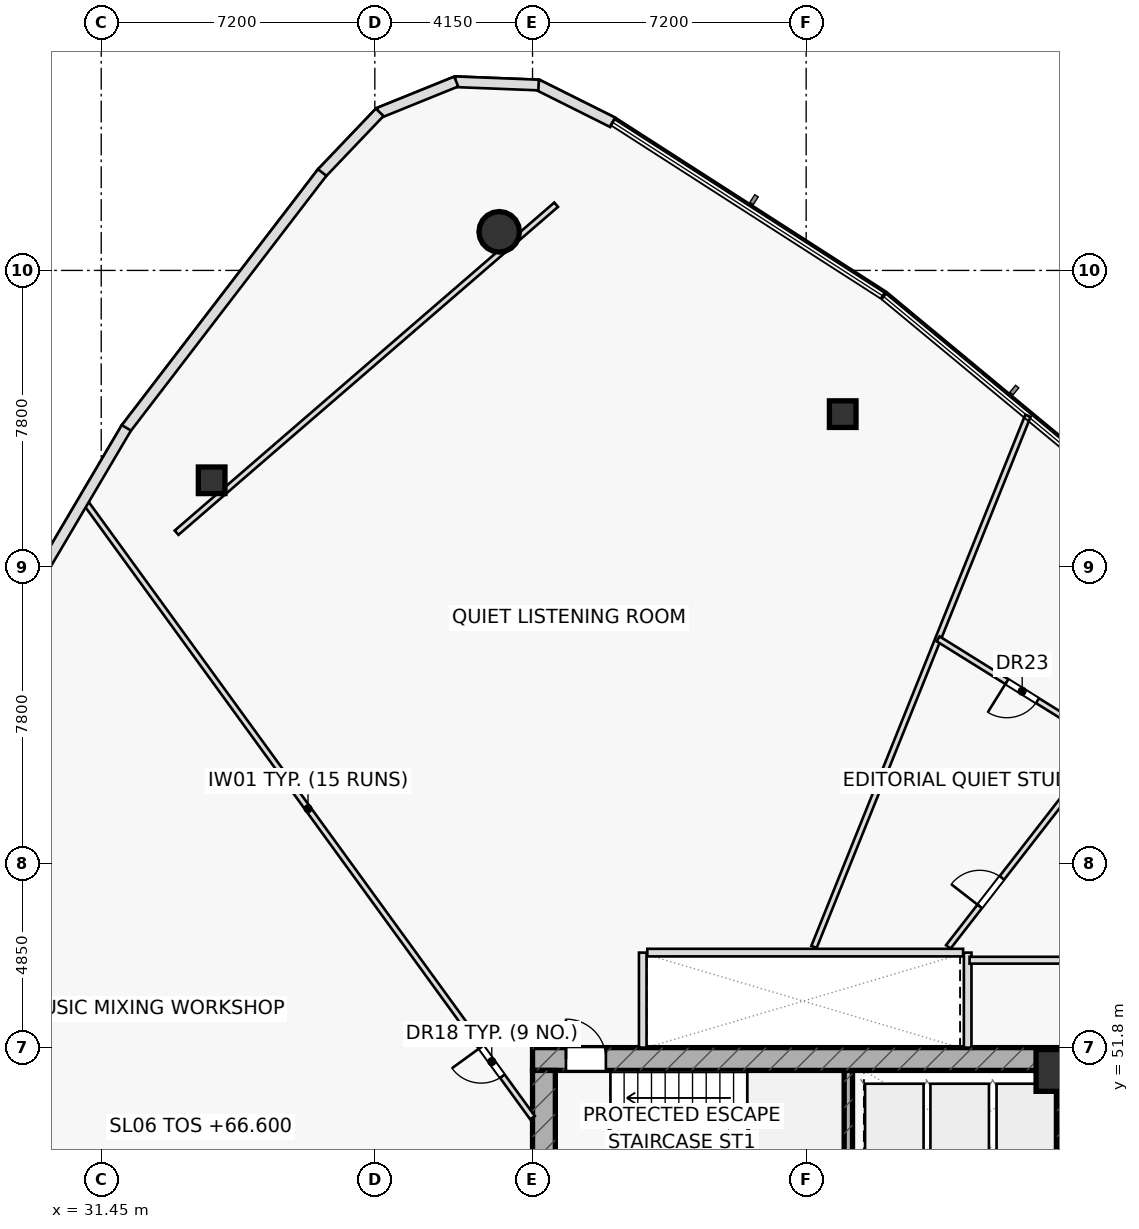
"""IFC4 building model, lengths in metres.
Left out: names, types, materials, properties, quantities, classifications, styles, units other than length and angle.
Written with IfcOpenShell. Run it as: python <this file> out.ifc"""

import sys

from ifc_helpers import new_model, si_unit, direction, frame, frame_2d, origin, origin_2d, place, context, subcontext, project, spatial, rectangle, hollow_rectangle, hollow_circle, extrude, element, fill, save


model = new_model("IFC4")
c1 = context("Model", 3, precision=1e-05, world=origin(), true_north=direction((0.0, 1.0)))
c2 = subcontext(c1, "Body", "Model", "MODEL_VIEW")
j1 = project(units=[si_unit("LENGTHUNIT", "METRE"), si_unit("PLANEANGLEUNIT", "RADIAN")], contexts=[c1])
p1 = place(None, origin())
s1 = spatial("IfcSite", under=j1, at=p1, CompositionType="ELEMENT")
p2 = place(p1, origin())
s2 = spatial("IfcBuilding", under=s1, at=p2, CompositionType="ELEMENT")
p3 = place(p2, frame((0.0, 0.0, 66.6)))
s3 = spatial("IfcBuildingStorey", under=s2, at=p3, CompositionType="ELEMENT", Elevation=66.6)
p4 = place(p3, frame((51.11, 48.1, 0.0), z_axis=(0.0, 0.0, 1.0), x_axis=(0.0, 1.0, 0.0)))
e1 = element("IfcWall", 1, at=p4, inside=s3, PredefinedType="SHEAR", context=c2, shape_type="SweptSolid", body=[
    extrude(rectangle(XDim=3.1, YDim=0.22, at=frame_2d((1.55, 0.0))), origin(), (0.0, 0.0, 1.0), 3.6),
])
p5 = place(p3, frame((42.8, 51.5, 0.0), z_axis=(0.0, 0.0, 1.0), x_axis=(1.0, 0.0, 0.0)))
e2 = element("IfcWall", 2, at=p5, inside=s3, PredefinedType="SHEAR", context=c2, shape_type="SweptSolid", body=[
    extrude(rectangle(XDim=14.4, YDim=0.6, at=frame_2d((7.2, 0.0))), origin(), (0.0, 0.0, 1.0), 3.6),
])
p6 = place(p5, frame((0.88, 0.0, 0.0)))
e3 = element("IfcOpeningElement", 3, at=p6, cuts=e2, PredefinedType="OPENING", context=c2, shape_type="SweptSolid", body=[
    extrude(rectangle(XDim=1.05, YDim=2.2, at=frame_2d((0.525, 1.1))), frame((0.0, 0.31, 0.0), z_axis=(0.0, -1.0, 0.0), x_axis=(1.0, 0.0, 0.0)), (0.0, 0.0, 1.0), 0.62),
])
p7 = place(p3, frame((43.1, 38.8, 0.0), z_axis=(0.0, 0.0, 1.0), x_axis=(0.0, 1.0, 0.0)))
e4 = element("IfcWall", 4, at=p7, inside=s3, PredefinedType="SHEAR", context=c2, shape_type="SweptSolid", body=[
    extrude(rectangle(XDim=12.4, YDim=0.6, at=frame_2d((6.2, 0.0))), origin(), (0.0, 0.0, 1.0), 3.6),
])
p8 = place(p3, frame((56.9, 38.8, 0.0), z_axis=(0.0, 0.0, 1.0), x_axis=(0.0, 1.0, 0.0)))
e5 = element("IfcWall", 5, at=p8, inside=s3, PredefinedType="SHEAR", context=c2, shape_type="SweptSolid", body=[
    extrude(rectangle(XDim=12.4, YDim=0.6, at=frame_2d((6.2, 0.0))), origin(), (0.0, 0.0, 1.0), 3.6),
])
p9 = place(p8, frame((3.85, 0.0, 0.0)))
e6 = element("IfcOpeningElement", 6, at=p9, cuts=e5, PredefinedType="OPENING", context=c2, shape_type="SweptSolid", body=[
    extrude(rectangle(XDim=1.5, YDim=2.2, at=frame_2d((0.75, 1.1))), frame((0.0, 0.31, 0.0), z_axis=(0.0, -1.0, 0.0), x_axis=(1.0, 0.0, 0.0)), (0.0, 0.0, 1.0), 0.62),
])
p10 = place(p3, frame((56.6, 51.2, 0.0), z_axis=(0.0, 0.0, 1.0), x_axis=(1.0, 0.0, 0.0)))
e7 = element("IfcColumn", 7, at=p10, inside=s3, PredefinedType="COLUMN", context=c2, shape_type="SweptSolid", body=[
    extrude(rectangle(XDim=1.1, YDim=1.1, at=origin_2d()), origin(), (0.0, 0.0, 1.0), 3.6),
])
p11 = place(p3, frame((41.923, 73.266, 0.0), z_axis=(0.0, 0.0, 1.0), x_axis=(1.0, 0.0, 0.0)))
e8 = element("IfcColumn", 8, at=p11, inside=s3, PredefinedType="COLUMN", context=c2, shape_type="SweptSolid", body=[
    extrude(hollow_circle(Radius=0.533, WallThickness=0.045, at=origin_2d()), origin(), (0.0, 0.0, 1.0), 3.6),
])
for number, where, z_axis, x_axis in (
    (9, (34.356, 66.728, 0.0), (0.0, 0.0, 1.0), (1.0, 0.0, 0.0)),
    (10, (50.962, 68.469, 0.0), (0.0, 0.0, 1.0), (1.0, 0.0, 0.0)),
):
    element("IfcColumn", number, at=place(p3, frame(where, z_axis=z_axis, x_axis=x_axis)), inside=s3, PredefinedType="COLUMN", context=c2, shape_type="SweptSolid", body=[
        extrude(hollow_rectangle(XDim=0.7, YDim=0.7, WallThickness=0.04, at=origin_2d()), origin(), (0.0, 0.0, 1.0), 3.6),
    ])
for number, where, z_axis, x_axis in (
    (11, (45.7, 51.8, 0.0), (0.0, 0.0, 1.0), (0.0, 1.0, 0.0)),
    (12, (54.25, 51.8, 0.0), (0.0, 0.0, 1.0), (0.0, 1.0, 0.0)),
):
    element("IfcWall", number, at=place(p3, frame(where, z_axis=z_axis, x_axis=x_axis)), inside=s3, PredefinedType="PARTITIONING", context=c2, shape_type="SweptSolid", body=[
        extrude(rectangle(XDim=2.5, YDim=0.2, at=frame_2d((1.25, 0.0))), origin(), (0.0, 0.0, 1.0), 3.6),
    ])
p12 = place(p3, frame((43.421, 73.979, 0.0), z_axis=(0.0, 0.0, 1.0), x_axis=(-0.756659135409, -0.653809569218, 0.0)))
e13 = element("IfcWall", 13, at=p12, inside=s3, PredefinedType="PARTITIONING", context=c2, shape_type="SweptSolid", body=[
    extrude(rectangle(XDim=13.2, YDim=0.15, at=frame_2d((6.6, 0.0))), origin(), (0.0, 0.0, 1.0), 2.975),
])
p13 = place(p3, frame((42.8, 49.955, 0.0), z_axis=(0.0, 0.0, 1.0), x_axis=(-0.587794647475, 0.809010168292, 0.0)))
e14 = element("IfcWall", 14, at=p13, inside=s3, PredefinedType="PARTITIONING", context=c2, shape_type="SweptSolid", body=[
    extrude(rectangle(XDim=20.1, YDim=0.15, at=frame_2d((10.05, 0.0))), origin(), (0.0, 0.0, 1.0), 2.975),
])
p14 = place(p13, frame((1.35, 0.0, 0.0)))
e15 = element("IfcOpeningElement", 15, at=p14, cuts=e14, PredefinedType="OPENING", context=c2, shape_type="SweptSolid", body=[
    extrude(rectangle(XDim=0.95, YDim=2.05, at=frame_2d((0.475, 1.025))), frame((0.0, 0.085, 0.0), z_axis=(0.0, -1.0, 0.0), x_axis=(1.0, 0.0, 0.0)), (0.0, 0.0, 1.0), 0.17),
])
p15 = place(p3, frame((53.74, 54.45, 0.0), z_axis=(0.0, 0.0, 1.0), x_axis=(0.613412549252, 0.789762650687, 0.0)))
e16 = element("IfcWall", 16, at=p15, inside=s3, PredefinedType="PARTITIONING", context=c2, shape_type="SweptSolid", body=[
    extrude(rectangle(XDim=11.686, YDim=0.15, at=frame_2d((5.843, 0.0))), origin(), (0.0, 0.0, 1.0), 2.975),
])
p16 = place(p15, frame((1.35, 0.0, 0.0)))
e17 = element("IfcOpeningElement", 17, at=p16, cuts=e16, PredefinedType="OPENING", context=c2, shape_type="SweptSolid", body=[
    extrude(rectangle(XDim=0.95, YDim=2.05, at=frame_2d((0.475, 1.025))), frame((0.0, 0.085, 0.0), z_axis=(0.0, -1.0, 0.0), x_axis=(1.0, 0.0, 0.0)), (0.0, 0.0, 1.0), 0.17),
])
p17 = place(p3, frame((50.207, 54.45, 0.0), z_axis=(0.0, 0.0, 1.0), x_axis=(0.373638533128, 0.927574388695, 0.0)))
e18 = element("IfcWall", 18, at=p17, inside=s3, PredefinedType="PARTITIONING", context=c2, shape_type="SweptSolid", body=[
    extrude(rectangle(XDim=15.067, YDim=0.15, at=frame_2d((7.534, 0.0))), origin(), (0.0, 0.0, 1.0), 2.975),
])
p18 = place(p3, frame((57.898, 59.803, 0.0), z_axis=(0.0, 0.0, 1.0), x_axis=(-0.849125227798, 0.52819158221, 0.0)))
e19 = element("IfcWall", 19, at=p18, inside=s3, PredefinedType="PARTITIONING", context=c2, shape_type="SweptSolid", body=[
    extrude(rectangle(XDim=5.212, YDim=0.15, at=frame_2d((2.606, 0.0))), origin(), (0.0, 0.0, 1.0), 2.975),
])
p19 = place(p18, frame((2.131, 0.0, 0.0)))
e20 = element("IfcOpeningElement", 20, at=p19, cuts=e19, PredefinedType="OPENING", context=c2, shape_type="SweptSolid", body=[
    extrude(rectangle(XDim=0.95, YDim=2.05, at=frame_2d((0.475, 1.025))), frame((0.0, 0.085, 0.0), z_axis=(0.0, -1.0, 0.0), x_axis=(1.0, 0.0, 0.0)), (0.0, 0.0, 1.0), 0.17),
])
p20 = place(p3, frame((54.3, 54.1, 0.0), z_axis=(0.0, 0.0, 1.0), x_axis=(1.0, 0.0, 0.0)))
e21 = element("IfcWall", 21, at=p20, inside=s3, PredefinedType="PARTITIONING", context=c2, shape_type="SweptSolid", body=[
    extrude(rectangle(XDim=5.25, YDim=0.18, at=frame_2d((2.625, 0.0))), origin(), (0.0, 0.0, 1.0), 2.975),
])
p21 = place(p3, frame((44.908, 76.147, 0.0), z_axis=(0.0, 0.0, 1.0), x_axis=(-0.894537641372, 0.446992626527, 0.0)))
e22 = element("IfcWall", 22, at=p21, inside=s3, PredefinedType="STANDARD", context=c2, shape_type="SweptSolid", body=[
    extrude(rectangle(XDim=2.21, YDim=0.28, at=frame_2d((1.105, 0.0))), origin(), (0.0, 0.0, 1.0), 3.6),
])
p22 = place(p3, frame((42.959, 77.128, 0.0), z_axis=(0.0, 0.0, 1.0), x_axis=(-0.9992313538, 0.039200785496, 0.0)))
e23 = element("IfcWall", 23, at=p22, inside=s3, PredefinedType="STANDARD", context=c2, shape_type="SweptSolid", body=[
    extrude(rectangle(XDim=2.198, YDim=0.28, at=frame_2d((1.099, 0.0))), origin(), (0.0, 0.0, 1.0), 3.6),
])
p23 = place(p3, frame((40.792, 77.219, 0.0), z_axis=(0.0, 0.0, 1.0), x_axis=(-0.926875066851, -0.375369964768, 0.0)))
e24 = element("IfcWall", 24, at=p23, inside=s3, PredefinedType="STANDARD", context=c2, shape_type="SweptSolid", body=[
    extrude(rectangle(XDim=2.198, YDim=0.28, at=frame_2d((1.099, 0.0))), origin(), (0.0, 0.0, 1.0), 3.6),
])
p24 = place(p3, frame((38.778, 76.41, 0.0), z_axis=(0.0, 0.0, 1.0), x_axis=(-0.690253440864, -0.723567679886, 0.0)))
e25 = element("IfcWall", 25, at=p24, inside=s3, PredefinedType="STANDARD", context=c2, shape_type="SweptSolid", body=[
    extrude(rectangle(XDim=2.22, YDim=0.28, at=frame_2d((1.11, 0.0))), origin(), (0.0, 0.0, 1.0), 3.6),
])
p25 = place(p3, frame((37.265, 74.826, 0.0), z_axis=(0.0, 0.0, 1.0), x_axis=(-0.608421288517, -0.793614223461, 0.0)))
e26 = element("IfcWall", 26, at=p25, inside=s3, PredefinedType="STANDARD", context=c2, shape_type="SweptSolid", body=[
    extrude(rectangle(XDim=8.497, YDim=0.28, at=frame_2d((4.248, 0.0))), origin(), (0.0, 0.0, 1.0), 3.6),
])
p26 = place(p3, frame((32.112, 68.108, 0.0), z_axis=(0.0, 0.0, 1.0), x_axis=(-0.50795162741, -0.861385595544, 0.0)))
e27 = element("IfcWall", 27, at=p26, inside=s3, PredefinedType="STANDARD", context=c2, shape_type="SweptSolid", body=[
    extrude(rectangle(XDim=8.485, YDim=0.28, at=frame_2d((4.242, 0.0))), origin(), (0.0, 0.0, 1.0), 3.6),
])
p27 = place(p3, frame((45.82, 54.3, 0.0), z_axis=(0.0, 0.0, 1.0), x_axis=(1.0, 0.0, 0.0)))
e28 = element("IfcWall", 28, at=p27, inside=s3, PredefinedType="PARTITIONING", context=c2, shape_type="SweptSolid", body=[
    extrude(rectangle(XDim=8.31, YDim=0.2, at=frame_2d((4.155, 0.0))), origin(), (0.0, 0.0, 1.0), 3.6),
])
p28 = place(p6, origin())
e29 = element("IfcDoor", 29, at=p28, inside=s3, OperationType="SINGLE_SWING_LEFT", PredefinedType="DOOR", context=c2, shape_type="SweptSolid", body=[
    extrude(rectangle(XDim=1.05, YDim=2.2, at=frame_2d((0.525, 1.1))), frame((0.0, 0.025, 0.0), z_axis=(0.0, -1.0, 0.0), x_axis=(1.0, 0.0, 0.0)), (0.0, 0.0, 1.0), 0.05),
])
fill(e3, e29)
p29 = place(p14, origin())
e30 = element("IfcDoor", 30, at=p29, inside=s3, OperationType="SINGLE_SWING_RIGHT", PredefinedType="DOOR", context=c2, shape_type="SweptSolid", body=[
    extrude(rectangle(XDim=0.95, YDim=2.05, at=frame_2d((0.475, 1.025))), frame((0.0, 0.025, 0.0), z_axis=(0.0, -1.0, 0.0), x_axis=(1.0, 0.0, 0.0)), (0.0, 0.0, 1.0), 0.05),
])
fill(e15, e30)
p30 = place(p16, origin())
e31 = element("IfcDoor", 31, at=p30, inside=s3, OperationType="SINGLE_SWING_LEFT", PredefinedType="DOOR", context=c2, shape_type="SweptSolid", body=[
    extrude(rectangle(XDim=0.95, YDim=2.05, at=frame_2d((0.475, 1.025))), frame((0.0, 0.025, 0.0), z_axis=(0.0, -1.0, 0.0), x_axis=(1.0, 0.0, 0.0)), (0.0, 0.0, 1.0), 0.05),
])
fill(e17, e31)
p31 = place(p19, origin())
e32 = element("IfcDoor", 32, at=p31, inside=s3, OperationType="SINGLE_SWING_RIGHT", PredefinedType="DOOR", context=c2, shape_type="SweptSolid", body=[
    extrude(rectangle(XDim=0.95, YDim=2.05, at=frame_2d((0.475, 1.025))), frame((0.0, 0.025, 0.0), z_axis=(0.0, -1.0, 0.0), x_axis=(1.0, 0.0, 0.0)), (0.0, 0.0, 1.0), 0.05),
])
fill(e20, e32)
save(model, sys.argv[1])
